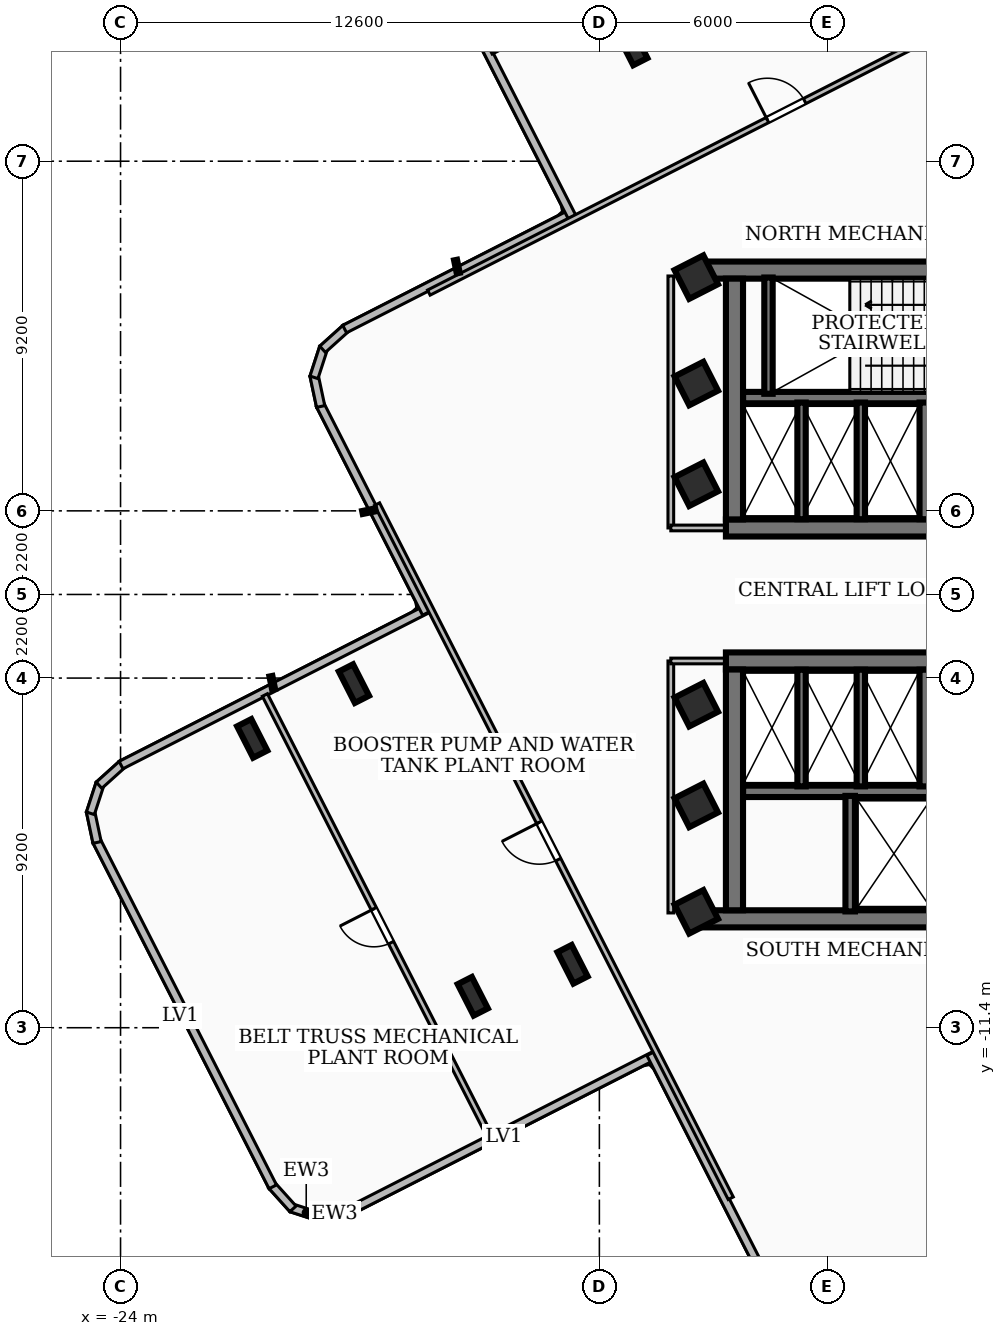
"""IFC4 building model, lengths in metres.
Left out: names, types, materials, properties, quantities, classifications, styles, units other than length and angle.
Written with IfcOpenShell. Run it as: python <this file> out.ifc"""

import sys

from ifc_helpers import new_model, si_unit, direction, frame, frame_2d, origin, origin_2d, place, context, subcontext, project, spatial, rectangle, i_section, extrude, element, fill, save


model = new_model("IFC4")
c1 = context("Model", 3, precision=1e-05, world=origin(), true_north=direction((0.0, 1.0)))
c2 = subcontext(c1, "Body", "Model", "MODEL_VIEW")
j1 = project(units=[si_unit("LENGTHUNIT", "METRE"), si_unit("PLANEANGLEUNIT", "RADIAN")], contexts=[c1])
p1 = place(None, origin())
s1 = spatial("IfcSite", under=j1, at=p1, CompositionType="ELEMENT")
p2 = place(p1, origin())
s2 = spatial("IfcBuilding", under=s1, at=p2, CompositionType="ELEMENT")
p3 = place(p2, frame((0.0, 0.0, 196.2)))
s3 = spatial("IfcBuildingStorey", under=s2, at=p3, CompositionType="ELEMENT", Elevation=196.2)
p4 = place(p3, frame((-8.78, 8.535, 0.0), z_axis=(0.0, 0.0, 1.0), x_axis=(1.0, 0.0, 0.0)))
e1 = element("IfcWall", 1, at=p4, inside=s3, PredefinedType="SHEAR", context=c2, shape_type="SweptSolid", body=[
    extrude(rectangle(XDim=17.56, YDim=0.45, at=frame_2d((8.78, 0.0))), origin(), (0.0, 0.0, 1.0), 4.42),
])
p5 = place(p3, frame((8.07, 1.75, 0.0), z_axis=(0.0, 0.0, 1.0), x_axis=(-1.0, 0.0, 0.0)))
e2 = element("IfcWall", 2, at=p5, inside=s3, PredefinedType="SHEAR", context=c2, shape_type="SweptSolid", body=[
    extrude(rectangle(XDim=16.14, YDim=0.45, at=frame_2d((8.07, 0.0))), origin(), (0.0, 0.0, 1.0), 4.42),
])
p6 = place(p5, frame((7.45, 0.0, 0.0)))
e3 = element("IfcOpeningElement", 3, at=p6, cuts=e2, PredefinedType="OPENING", context=c2, shape_type="SweptSolid", body=[
    extrude(rectangle(XDim=1.0, YDim=2.1, at=frame_2d((0.5, 1.05))), frame((0.0, 0.235, 0.0), z_axis=(0.0, -1.0, 0.0), x_axis=(1.0, 0.0, 0.0)), (0.0, 0.0, 1.0), 0.47),
])
p7 = place(p5, frame((3.85, 0.0, 0.0)))
e4 = element("IfcOpeningElement", 4, at=p7, cuts=e2, PredefinedType="OPENING", context=c2, shape_type="SweptSolid", body=[
    extrude(rectangle(XDim=0.9, YDim=2.06, at=frame_2d((0.45, 1.03))), frame((0.0, 0.235, 0.0), z_axis=(0.0, -1.0, 0.0), x_axis=(1.0, 0.0, 0.0)), (0.0, 0.0, 1.0), 0.47),
])
p8 = place(p5, frame((2.35, 0.0, 0.0)))
e5 = element("IfcOpeningElement", 5, at=p8, cuts=e2, PredefinedType="OPENING", context=c2, shape_type="SweptSolid", body=[
    extrude(rectangle(XDim=0.9, YDim=2.06, at=frame_2d((0.45, 1.03))), frame((0.0, 0.235, 0.0), z_axis=(0.0, -1.0, 0.0), x_axis=(1.0, 0.0, 0.0)), (0.0, 0.0, 1.0), 0.47),
])
p9 = place(p5, frame((0.8, 0.0, 0.0)))
e6 = element("IfcOpeningElement", 6, at=p9, cuts=e2, PredefinedType="OPENING", context=c2, shape_type="SweptSolid", body=[
    extrude(rectangle(XDim=0.9, YDim=2.06, at=frame_2d((0.45, 1.03))), frame((0.0, 0.235, 0.0), z_axis=(0.0, -1.0, 0.0), x_axis=(1.0, 0.0, 0.0)), (0.0, 0.0, 1.0), 0.47),
])
p10 = place(p3, frame((-7.845, 1.975, 0.0), z_axis=(0.0, 0.0, 1.0), x_axis=(0.0, 1.0, 0.0)))
e7 = element("IfcWall", 7, at=p10, inside=s3, PredefinedType="SHEAR", context=c2, shape_type="SweptSolid", body=[
    extrude(rectangle(XDim=6.335, YDim=0.45, at=frame_2d((3.167, 0.0))), origin(), (0.0, 0.0, 1.0), 4.42),
])
p11 = place(p3, frame((7.62, 5.18, 0.0), z_axis=(0.0, 0.0, 1.0), x_axis=(-1.0, 0.0, 0.0)))
e8 = element("IfcWall", 8, at=p11, inside=s3, PredefinedType="SOLIDWALL", context=c2, shape_type="SweptSolid", body=[
    extrude(rectangle(XDim=15.24, YDim=0.3, at=frame_2d((7.62, 0.0))), origin(), (0.0, 0.0, 1.0), 4.42),
])
p12 = place(p11, frame((5.77, 0.0, 0.0)))
e9 = element("IfcOpeningElement", 9, at=p12, cuts=e8, PredefinedType="OPENING", context=c2, shape_type="SweptSolid", body=[
    extrude(rectangle(XDim=1.1, YDim=2.15, at=frame_2d((0.55, 1.075))), frame((0.0, 0.16, 0.0), z_axis=(0.0, -1.0, 0.0), x_axis=(1.0, 0.0, 0.0)), (0.0, 0.0, 1.0), 0.32),
])
p13 = place(p11, frame((2.97, 0.0, 0.0)))
e10 = element("IfcOpeningElement", 10, at=p13, cuts=e8, PredefinedType="OPENING", context=c2, shape_type="SweptSolid", body=[
    extrude(rectangle(XDim=1.1, YDim=2.15, at=frame_2d((0.55, 1.075))), frame((0.0, 0.16, 0.0), z_axis=(0.0, -1.0, 0.0), x_axis=(1.0, 0.0, 0.0)), (0.0, 0.0, 1.0), 0.32),
])
p14 = place(p11, frame((7.97, 0.0, 0.0)))
e11 = element("IfcOpeningElement", 11, at=p14, cuts=e8, PredefinedType="OPENING", context=c2, shape_type="SweptSolid", body=[
    extrude(rectangle(XDim=1.0, YDim=2.1, at=frame_2d((0.5, 1.05))), frame((0.0, 0.16, 0.0), z_axis=(0.0, -1.0, 0.0), x_axis=(1.0, 0.0, 0.0)), (0.0, 0.0, 1.0), 0.32),
])
p15 = place(p3, frame((8.78, -8.535, 0.0), z_axis=(0.0, 0.0, 1.0), x_axis=(-1.0, 0.0, 0.0)))
e12 = element("IfcWall", 12, at=p15, inside=s3, PredefinedType="SHEAR", context=c2, shape_type="SweptSolid", body=[
    extrude(rectangle(XDim=17.56, YDim=0.45, at=frame_2d((8.78, 0.0))), origin(), (0.0, 0.0, 1.0), 4.42),
])
p16 = place(p3, frame((-8.07, -1.75, 0.0), z_axis=(0.0, 0.0, 1.0), x_axis=(1.0, 0.0, 0.0)))
e13 = element("IfcWall", 13, at=p16, inside=s3, PredefinedType="SHEAR", context=c2, shape_type="SweptSolid", body=[
    extrude(rectangle(XDim=16.14, YDim=0.45, at=frame_2d((8.07, 0.0))), origin(), (0.0, 0.0, 1.0), 4.42),
])
p17 = place(p16, frame((7.45, 0.0, 0.0)))
e14 = element("IfcOpeningElement", 14, at=p17, cuts=e13, PredefinedType="OPENING", context=c2, shape_type="SweptSolid", body=[
    extrude(rectangle(XDim=1.0, YDim=2.1, at=frame_2d((0.5, 1.05))), frame((0.0, 0.235, 0.0), z_axis=(0.0, -1.0, 0.0), x_axis=(1.0, 0.0, 0.0)), (0.0, 0.0, 1.0), 0.47),
])
p18 = place(p16, frame((12.65, 0.0, 0.0)))
e15 = element("IfcOpeningElement", 15, at=p18, cuts=e13, PredefinedType="OPENING", context=c2, shape_type="SweptSolid", body=[
    extrude(rectangle(XDim=0.9, YDim=2.06, at=frame_2d((0.45, 1.03))), frame((0.0, 0.235, 0.0), z_axis=(0.0, -1.0, 0.0), x_axis=(1.0, 0.0, 0.0)), (0.0, 0.0, 1.0), 0.47),
])
p19 = place(p3, frame((-7.845, -8.31, 0.0), z_axis=(0.0, 0.0, 1.0), x_axis=(0.0, 1.0, 0.0)))
e16 = element("IfcWall", 16, at=p19, inside=s3, PredefinedType="SHEAR", context=c2, shape_type="SweptSolid", body=[
    extrude(rectangle(XDim=6.335, YDim=0.45, at=frame_2d((3.167, 0.0))), origin(), (0.0, 0.0, 1.0), 4.42),
])
p20 = place(p3, frame((-7.62, -5.18, 0.0), z_axis=(0.0, 0.0, 1.0), x_axis=(1.0, 0.0, 0.0)))
e17 = element("IfcWall", 17, at=p20, inside=s3, PredefinedType="SOLIDWALL", context=c2, shape_type="SweptSolid", body=[
    extrude(rectangle(XDim=15.24, YDim=0.3, at=frame_2d((7.62, 0.0))), origin(), (0.0, 0.0, 1.0), 4.42),
])
p21 = place(p20, frame((5.77, 0.0, 0.0)))
e18 = element("IfcOpeningElement", 18, at=p21, cuts=e17, PredefinedType="OPENING", context=c2, shape_type="SweptSolid", body=[
    extrude(rectangle(XDim=1.1, YDim=2.15, at=frame_2d((0.55, 1.075))), frame((0.0, 0.16, 0.0), z_axis=(0.0, -1.0, 0.0), x_axis=(1.0, 0.0, 0.0)), (0.0, 0.0, 1.0), 0.32),
])
p22 = place(p20, frame((7.97, 0.0, 0.0)))
e19 = element("IfcOpeningElement", 19, at=p22, cuts=e17, PredefinedType="OPENING", context=c2, shape_type="SweptSolid", body=[
    extrude(rectangle(XDim=1.0, YDim=2.1, at=frame_2d((0.5, 1.05))), frame((0.0, 0.16, 0.0), z_axis=(0.0, -1.0, 0.0), x_axis=(1.0, 0.0, 0.0)), (0.0, 0.0, 1.0), 0.32),
])
p23 = place(p3, frame((-6.95, 5.28, 0.0), z_axis=(0.0, 0.0, 1.0), x_axis=(0.0, 1.0, 0.0)))
e20 = element("IfcWall", 20, at=p23, inside=s3, PredefinedType="SOLIDWALL", context=c2, shape_type="SweptSolid", body=[
    extrude(rectangle(XDim=3.06, YDim=0.22, at=frame_2d((1.53, 0.0))), origin(), (0.0, 0.0, 1.0), 4.42),
])
p24 = place(p3, frame((-2.85, 1.98, 0.0), z_axis=(0.0, 0.0, 1.0), x_axis=(0.0, 1.0, 0.0)))
e21 = element("IfcWall", 21, at=p24, inside=s3, PredefinedType="SOLIDWALL", context=c2, shape_type="SweptSolid", body=[
    extrude(rectangle(XDim=3.07, YDim=0.25, at=frame_2d((1.535, 0.0))), origin(), (0.0, 0.0, 1.0), 4.42),
])
p25 = place(p3, frame((-4.8, -8.34, 0.0), z_axis=(0.0, 0.0, 1.0), x_axis=(0.0, 1.0, 0.0)))
e22 = element("IfcWall", 22, at=p25, inside=s3, PredefinedType="SOLIDWALL", context=c2, shape_type="SweptSolid", body=[
    extrude(rectangle(XDim=3.04, YDim=0.25, at=frame_2d((1.52, 0.0))), origin(), (0.0, 0.0, 1.0), 4.42),
])
p26 = place(p3, frame((-2.85, -5.05, 0.0), z_axis=(0.0, 0.0, 1.0), x_axis=(0.0, 1.0, 0.0)))
e23 = element("IfcWall", 23, at=p26, inside=s3, PredefinedType="SOLIDWALL", context=c2, shape_type="SweptSolid", body=[
    extrude(rectangle(XDim=3.07, YDim=0.25, at=frame_2d((1.535, 0.0))), origin(), (0.0, 0.0, 1.0), 4.42),
])
for number, where, z_axis, x_axis in (
    (24, (-6.08, 1.98, 0.0), (0.0, 0.0, 1.0), (0.0, 1.0, 0.0)),
    (25, (-4.52, 1.98, 0.0), (0.0, 0.0, 1.0), (0.0, 1.0, 0.0)),
    (26, (-6.08, -5.05, 0.0), (0.0, 0.0, 1.0), (0.0, 1.0, 0.0)),
    (27, (-4.52, -5.05, 0.0), (0.0, 0.0, 1.0), (0.0, 1.0, 0.0)),
):
    element("IfcWall", number, at=place(p3, frame(where, z_axis=z_axis, x_axis=x_axis)), inside=s3, PredefinedType="SOLIDWALL", context=c2, shape_type="SweptSolid", body=[
        extrude(rectangle(XDim=3.07, YDim=0.22, at=frame_2d((1.535, 0.0))), origin(), (0.0, 0.0, 1.0), 4.42),
    ])
for number, where, z_axis, x_axis in (
    (28, (-8.85, -5.55, 0.0), (0.0, 0.0, 1.0), (0.891, 0.454, 0.0)),
    (29, (-8.85, -2.9, 0.0), (0.0, 0.0, 1.0), (0.891, 0.454, 0.0)),
    (30, (-8.85, 2.9, 0.0), (0.0, 0.0, 1.0), (0.891, 0.454, 0.0)),
    (31, (-8.85, 5.55, 0.0), (0.0, 0.0, 1.0), (0.891, 0.454, 0.0)),
    (32, (-8.85, 8.35, 0.0), (0.0, 0.0, 1.0), (0.891, 0.454, 0.0)),
    (33, (-8.85, -8.35, 0.0), (0.0, 0.0, 1.0), (0.891, 0.454, 0.0)),
):
    element("IfcColumn", number, at=place(p3, frame(where, z_axis=z_axis, x_axis=x_axis)), inside=s3, PredefinedType="COLUMN", context=c2, shape_type="SweptSolid", body=[
        extrude(rectangle(XDim=0.85, YDim=0.85, at=origin_2d()), origin(), (0.0, 0.0, 1.0), 4.68),
    ])
for number, where, z_axis, x_axis in (
    (34, (-10.533, 14.433, 0.0), (0.0, 0.0, 1.0), (0.891, 0.454, 0.0)),
    (35, (-17.858, -2.346, 0.0), (0.0, 0.0, 1.0), (0.891, 0.454, 0.0)),
    (36, (-12.106, -9.731, 0.0), (0.0, 0.0, 1.0), (0.891, 0.454, 0.0)),
    (37, (-20.535, -3.788, 0.0), (0.0, 0.0, 1.0), (0.891, 0.454, 0.0)),
    (38, (-14.731, -10.573, 0.0), (0.0, 0.0, 1.0), (0.891, 0.454, 0.0)),
):
    element("IfcColumn", number, at=place(p3, frame(where, z_axis=z_axis, x_axis=x_axis)), inside=s3, PredefinedType="COLUMN", context=c2, shape_type="SweptSolid", body=[
        extrude(i_section(OverallWidth=0.418, OverallDepth=0.927, WebThickness=0.019, FlangeThickness=0.032, at=origin_2d()), origin(), (0.0, 0.0, 1.0), 4.68),
    ])
p27 = place(p3, frame((-9.933, -12.12, 0.0), z_axis=(0.0, 0.0, 1.0), x_axis=(-0.89100493447, -0.453993619724, 0.0)))
e39 = element("IfcWall", 39, at=p27, inside=s3, PredefinedType="SOLIDWALL", context=c2, shape_type="SweptSolid", body=[
    extrude(rectangle(XDim=9.057, YDim=0.22, at=frame_2d((4.528, 0.0))), origin(), (0.0, 0.0, 1.0), 4.42),
])
p28 = place(p3, frame((-17.957, -16.216, 0.0), z_axis=(0.0, 0.0, 1.0), x_axis=(-0.978237730275, -0.207487211814, 0.0)))
e40 = element("IfcWall", 40, at=p28, inside=s3, PredefinedType="SOLIDWALL", context=c2, shape_type="SweptSolid", body=[
    extrude(rectangle(XDim=0.833, YDim=0.22, at=frame_2d((0.417, 0.0))), origin(), (0.0, 0.0, 1.0), 4.42),
])
p29 = place(p3, frame((-18.724, -16.392, 0.0), z_axis=(0.0, 0.0, 1.0), x_axis=(-0.951125937775, 0.308803255314, 0.0)))
e41 = element("IfcWall", 41, at=p29, inside=s3, PredefinedType="SOLIDWALL", context=c2, shape_type="SweptSolid", body=[
    extrude(rectangle(XDim=0.82, YDim=0.22, at=frame_2d((0.41, 0.0))), origin(), (0.0, 0.0, 1.0), 4.42),
])
p30 = place(p3, frame((-19.463, -16.166, 0.0), z_axis=(0.0, 0.0, 1.0), x_axis=(-0.669029293194, 0.743236035758, 0.0)))
e42 = element("IfcWall", 42, at=p30, inside=s3, PredefinedType="SOLIDWALL", context=c2, shape_type="SweptSolid", body=[
    extrude(rectangle(XDim=0.836, YDim=0.22, at=frame_2d((0.418, 0.0))), origin(), (0.0, 0.0, 1.0), 4.42),
])
p31 = place(p3, frame((-19.994, -15.586, 0.0), z_axis=(0.0, 0.0, 1.0), x_axis=(-0.453908605083, 0.891048246859, 0.0)))
e43 = element("IfcWall", 43, at=p31, inside=s3, PredefinedType="SOLIDWALL", context=c2, shape_type="SweptSolid", body=[
    extrude(rectangle(XDim=10.22, YDim=0.22, at=frame_2d((5.11, 0.0))), origin(), (0.0, 0.0, 1.0), 4.42),
])
p32 = place(p3, frame((-24.617, -6.525, 0.0), z_axis=(0.0, 0.0, 1.0), x_axis=(-0.207767630705, 0.978178210569, 0.0)))
e44 = element("IfcWall", 44, at=p32, inside=s3, PredefinedType="SOLIDWALL", context=c2, shape_type="SweptSolid", body=[
    extrude(rectangle(XDim=0.833, YDim=0.22, at=frame_2d((0.417, 0.0))), origin(), (0.0, 0.0, 1.0), 4.42),
])
p33 = place(p3, frame((-24.793, -5.758, 0.0), z_axis=(0.0, 0.0, 1.0), x_axis=(0.309874227346, 0.950777557174, 0.0)))
e45 = element("IfcWall", 45, at=p33, inside=s3, PredefinedType="SOLIDWALL", context=c2, shape_type="SweptSolid", body=[
    extrude(rectangle(XDim=0.819, YDim=0.22, at=frame_2d((0.41, 0.0))), origin(), (0.0, 0.0, 1.0), 4.42),
])
p34 = place(p3, frame((-24.566, -5.02, 0.0), z_axis=(0.0, 0.0, 1.0), x_axis=(0.742581132082, 0.669756121492, 0.0)))
e46 = element("IfcWall", 46, at=p34, inside=s3, PredefinedType="SOLIDWALL", context=c2, shape_type="SweptSolid", body=[
    extrude(rectangle(XDim=0.835, YDim=0.22, at=frame_2d((0.417, 0.0))), origin(), (0.0, 0.0, 1.0), 4.42),
])
p35 = place(p3, frame((-23.987, -4.489, 0.0), z_axis=(0.0, 0.0, 1.0), x_axis=(0.891021807194, 0.453960503904, 0.0)))
e47 = element("IfcWall", 47, at=p35, inside=s3, PredefinedType="SOLIDWALL", context=c2, shape_type="SweptSolid", body=[
    extrude(rectangle(XDim=9.058, YDim=0.22, at=frame_2d((4.529, 0.0))), origin(), (0.0, 0.0, 1.0), 2.212),
])
p36 = place(p3, frame((-15.954, -0.495, 0.0), z_axis=(0.0, 0.0, 1.0), x_axis=(-0.454003577481, 0.890999860625, 0.0)))
e48 = element("IfcWall", 48, at=p36, inside=s3, PredefinedType="SOLIDWALL", context=c2, shape_type="SweptSolid", body=[
    extrude(rectangle(XDim=6.158, YDim=0.22, at=frame_2d((3.079, 0.0))), origin(), (0.0, 0.0, 1.0), 2.212),
])
p37 = place(p3, frame((-18.734, 4.946, 0.0), z_axis=(0.0, 0.0, 1.0), x_axis=(-0.207767630705, 0.978178210569, 0.0)))
e49 = element("IfcWall", 49, at=p37, inside=s3, PredefinedType="SOLIDWALL", context=c2, shape_type="SweptSolid", body=[
    extrude(rectangle(XDim=0.833, YDim=0.22, at=frame_2d((0.417, 0.0))), origin(), (0.0, 0.0, 1.0), 4.42),
])
p38 = place(p3, frame((-18.91, 5.713, 0.0), z_axis=(0.0, 0.0, 1.0), x_axis=(0.309523466815, 0.950891804303, 0.0)))
e50 = element("IfcWall", 50, at=p38, inside=s3, PredefinedType="SOLIDWALL", context=c2, shape_type="SweptSolid", body=[
    extrude(rectangle(XDim=0.82, YDim=0.22, at=frame_2d((0.41, 0.0))), origin(), (0.0, 0.0, 1.0), 4.42),
])
p39 = place(p3, frame((-18.683, 6.452, 0.0), z_axis=(0.0, 0.0, 1.0), x_axis=(0.743236035758, 0.669029293194, 0.0)))
e51 = element("IfcWall", 51, at=p39, inside=s3, PredefinedType="SOLIDWALL", context=c2, shape_type="SweptSolid", body=[
    extrude(rectangle(XDim=0.836, YDim=0.22, at=frame_2d((0.418, 0.0))), origin(), (0.0, 0.0, 1.0), 4.42),
])
p40 = place(p3, frame((-18.103, 6.983, 0.0), z_axis=(0.0, 0.0, 1.0), x_axis=(0.890990691232, 0.454021572326, 0.0)))
e52 = element("IfcWall", 52, at=p40, inside=s3, PredefinedType="SOLIDWALL", context=c2, shape_type="SweptSolid", body=[
    extrude(rectangle(XDim=6.758, YDim=0.22, at=frame_2d((3.379, 0.0))), origin(), (0.0, 0.0, 1.0), 2.212),
])
p41 = place(p3, frame((-12.12, 9.933, 0.0), z_axis=(0.0, 0.0, 1.0), x_axis=(-0.454013036743, 0.890995040652, 0.0)))
e53 = element("IfcWall", 53, at=p41, inside=s3, PredefinedType="SOLIDWALL", context=c2, shape_type="SweptSolid", body=[
    extrude(rectangle(XDim=8.257, YDim=0.22, at=frame_2d((4.128, 0.0))), origin(), (0.0, 0.0, 1.0), 2.212),
])
p42 = place(p3, frame((0.495, -15.954, 0.0), z_axis=(0.0, 0.0, 1.0), x_axis=(-0.890999860625, -0.454003577481, 0.0)))
e54 = element("IfcWall", 54, at=p42, inside=s3, PredefinedType="SOLIDWALL", context=c2, shape_type="SweptSolid", body=[
    extrude(rectangle(XDim=6.158, YDim=0.22, at=frame_2d((3.079, 0.0))), origin(), (0.0, 0.0, 1.0), 2.212),
])
p43 = place(p3, frame((-6.983, -18.103, 0.0), z_axis=(0.0, 0.0, 1.0), x_axis=(-0.454021572326, 0.890990691232, 0.0)))
e55 = element("IfcWall", 55, at=p43, inside=s3, PredefinedType="SOLIDWALL", context=c2, shape_type="SweptSolid", body=[
    extrude(rectangle(XDim=6.758, YDim=0.22, at=frame_2d((3.379, 0.0))), origin(), (0.0, 0.0, 1.0), 4.42),
])
p44 = place(p3, frame((-9.52, 1.75, 0.0), z_axis=(0.0, 0.0, 1.0), x_axis=(0.0, 1.0, 0.0)))
e56 = element("IfcWall", 56, at=p44, inside=s3, PredefinedType="PARTITIONING", context=c2, shape_type="SweptSolid", body=[
    extrude(rectangle(XDim=6.63, YDim=0.15, at=frame_2d((3.315, 0.0))), origin(), (0.0, 0.0, 1.0), 4.42),
])
p45 = place(p3, frame((-7.85, 1.75, 0.0), z_axis=(0.0, 0.0, 1.0), x_axis=(-1.0, 0.0, 0.0)))
e57 = element("IfcWall", 57, at=p45, inside=s3, PredefinedType="PARTITIONING", context=c2, shape_type="SweptSolid", body=[
    extrude(rectangle(XDim=1.67, YDim=0.15, at=frame_2d((0.835, 0.0))), origin(), (0.0, 0.0, 1.0), 3.65),
])
p46 = place(p3, frame((-9.52, -8.38, 0.0), z_axis=(0.0, 0.0, 1.0), x_axis=(0.0, 1.0, 0.0)))
e58 = element("IfcWall", 58, at=p46, inside=s3, PredefinedType="PARTITIONING", context=c2, shape_type="SweptSolid", body=[
    extrude(rectangle(XDim=6.63, YDim=0.15, at=frame_2d((3.315, 0.0))), origin(), (0.0, 0.0, 1.0), 2.212),
])
p47 = place(p3, frame((-7.85, -1.75, 0.0), z_axis=(0.0, 0.0, 1.0), x_axis=(-1.0, 0.0, 0.0)))
e59 = element("IfcWall", 59, at=p47, inside=s3, PredefinedType="PARTITIONING", context=c2, shape_type="SweptSolid", body=[
    extrude(rectangle(XDim=1.67, YDim=0.15, at=frame_2d((0.835, 0.0))), origin(), (0.0, 0.0, 1.0), 3.65),
])
p48 = place(p3, frame((-15.887, 7.943, 0.0), z_axis=(0.0, 0.0, 1.0), x_axis=(0.890987682839, 0.454027476073, 0.0)))
e60 = element("IfcWall", 60, at=p48, inside=s3, PredefinedType="PARTITIONING", context=c2, shape_type="SweptSolid", body=[
    extrude(rectangle(XDim=20.499, YDim=0.15, at=frame_2d((10.249, 0.0))), origin(), (0.0, 0.0, 1.0), 2.212),
])
p49 = place(p48, frame((10.0, 0.0, 0.0)))
e61 = element("IfcOpeningElement", 61, at=p49, cuts=e60, PredefinedType="OPENING", context=c2, shape_type="SweptSolid", body=[
    extrude(rectangle(XDim=1.1, YDim=2.15, at=frame_2d((0.55, 1.075))), frame((0.0, 0.085, 0.0), z_axis=(0.0, -1.0, 0.0), x_axis=(1.0, 0.0, 0.0)), (0.0, 0.0, 1.0), 0.17),
])
p50 = place(p3, frame((-14.254, 14.286, 0.0), z_axis=(0.0, 0.0, 1.0), x_axis=(0.890975712232, 0.454050966536, 0.0)))
e62 = element("IfcWall", 62, at=p50, inside=s3, PredefinedType="PARTITIONING", context=c2, shape_type="SweptSolid", body=[
    extrude(rectangle(XDim=13.029, YDim=0.15, at=frame_2d((6.515, 0.0))), origin(), (0.0, 0.0, 1.0), 2.212),
])
p51 = place(p50, frame((5.715, 0.0, 0.0)))
e63 = element("IfcOpeningElement", 63, at=p51, cuts=e62, PredefinedType="OPENING", context=c2, shape_type="SweptSolid", body=[
    extrude(rectangle(XDim=1.0, YDim=2.1, at=frame_2d((0.5, 1.05))), frame((0.0, 0.085, 0.0), z_axis=(0.0, -1.0, 0.0), x_axis=(1.0, 0.0, 0.0)), (0.0, 0.0, 1.0), 0.17),
])
p52 = place(p3, frame((-7.943, -15.887, 0.0), z_axis=(0.0, 0.0, 1.0), x_axis=(-0.454027476073, 0.890987682839, 0.0)))
e64 = element("IfcWall", 64, at=p52, inside=s3, PredefinedType="PARTITIONING", context=c2, shape_type="SweptSolid", body=[
    extrude(rectangle(XDim=20.499, YDim=0.15, at=frame_2d((10.249, 0.0))), origin(), (0.0, 0.0, 1.0), 2.212),
])
p53 = place(p52, frame((10.0, 0.0, 0.0)))
e65 = element("IfcOpeningElement", 65, at=p53, cuts=e64, PredefinedType="OPENING", context=c2, shape_type="SweptSolid", body=[
    extrude(rectangle(XDim=1.1, YDim=2.15, at=frame_2d((0.55, 1.075))), frame((0.0, 0.085, 0.0), z_axis=(0.0, -1.0, 0.0), x_axis=(1.0, 0.0, 0.0)), (0.0, 0.0, 1.0), 0.17),
])
p54 = place(p3, frame((-14.286, -14.254, 0.0), z_axis=(0.0, 0.0, 1.0), x_axis=(-0.454050966536, 0.890975712232, 0.0)))
e66 = element("IfcWall", 66, at=p54, inside=s3, PredefinedType="PARTITIONING", context=c2, shape_type="SweptSolid", body=[
    extrude(rectangle(XDim=13.029, YDim=0.15, at=frame_2d((6.515, 0.0))), origin(), (0.0, 0.0, 1.0), 2.212),
])
p55 = place(p54, frame((5.715, 0.0, 0.0)))
e67 = element("IfcOpeningElement", 67, at=p55, cuts=e66, PredefinedType="OPENING", context=c2, shape_type="SweptSolid", body=[
    extrude(rectangle(XDim=1.0, YDim=2.1, at=frame_2d((0.5, 1.05))), frame((0.0, 0.085, 0.0), z_axis=(0.0, -1.0, 0.0), x_axis=(1.0, 0.0, 0.0)), (0.0, 0.0, 1.0), 0.17),
])
p56 = place(p49, origin())
e68 = element("IfcDoor", 68, at=p56, inside=s3, OperationType="SINGLE_SWING_LEFT", PredefinedType="DOOR", context=c2, shape_type="SweptSolid", body=[
    extrude(rectangle(XDim=1.1, YDim=2.15, at=frame_2d((0.55, 1.075))), frame((0.0, 0.025, 0.0), z_axis=(0.0, -1.0, 0.0), x_axis=(1.0, 0.0, 0.0)), (0.0, 0.0, 1.0), 0.05),
])
fill(e61, e68)
p57 = place(p53, origin())
e69 = element("IfcDoor", 69, at=p57, inside=s3, OperationType="SINGLE_SWING_RIGHT", PredefinedType="DOOR", context=c2, shape_type="SweptSolid", body=[
    extrude(rectangle(XDim=1.1, YDim=2.15, at=frame_2d((0.55, 1.075))), frame((0.0, 0.025, 0.0), z_axis=(0.0, -1.0, 0.0), x_axis=(1.0, 0.0, 0.0)), (0.0, 0.0, 1.0), 0.05),
])
fill(e65, e69)
p58 = place(p55, origin())
e70 = element("IfcDoor", 70, at=p58, inside=s3, OperationType="SINGLE_SWING_RIGHT", PredefinedType="DOOR", context=c2, shape_type="SweptSolid", body=[
    extrude(rectangle(XDim=1.0, YDim=2.1, at=frame_2d((0.5, 1.05))), frame((0.0, 0.025, 0.0), z_axis=(0.0, -1.0, 0.0), x_axis=(1.0, 0.0, 0.0)), (0.0, 0.0, 1.0), 0.05),
])
fill(e67, e70)
save(model, sys.argv[1])
